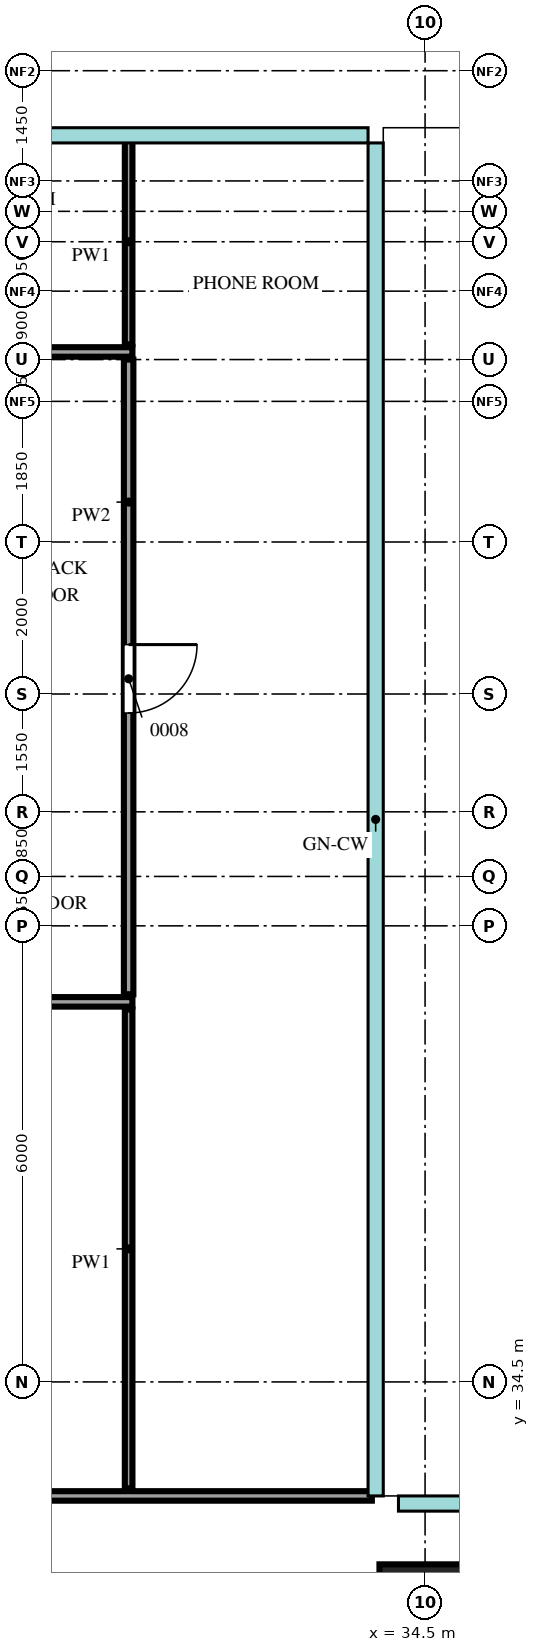
"""IFC4 building model, lengths in metres.
Left out: names, types, materials, properties, quantities, classifications, styles, units other than length and angle.
Written with IfcOpenShell. Run it as: python <this file> out.ifc"""

import sys

from ifc_helpers import new_model, si_unit, direction, frame, frame_2d, origin, origin_2d, place, context, subcontext, project, spatial, rectangle, extrude, source, transform, mapped, element, fill, save


model = new_model("IFC4")
c1 = context("Model", 3, precision=1e-05, world=origin(), true_north=direction((0.0, 1.0)))
c2 = subcontext(c1, "Body", "Model", "MODEL_VIEW")
j1 = project(units=[si_unit("LENGTHUNIT", "METRE"), si_unit("PLANEANGLEUNIT", "RADIAN")], contexts=[c1])
p1 = place(None, origin())
s1 = spatial("IfcSite", under=j1, at=p1, CompositionType="ELEMENT")
p2 = place(p1, origin())
s2 = spatial("IfcBuilding", under=s1, at=p2, CompositionType="ELEMENT")
p3 = place(p2, frame((0.0, 0.0, 184.7)))
s3 = spatial("IfcBuildingStorey", under=s2, at=p3, CompositionType="ELEMENT", Elevation=184.7)
m1 = source(origin(), c2, "Body", "SweptSolid", [
    extrude(rectangle(XDim=1.2, YDim=1.2, at=origin_2d()), origin(), (0.0, 0.0, 1.0), 3.75),
])
p4 = place(p3, frame((34.5, 31.5, 0.0), z_axis=(0.0, 0.0, 1.0), x_axis=(1.0, 0.0, 0.0)))
e1 = element("IfcColumn", 1, at=p4, inside=s3, PredefinedType="COLUMN", context=c2, shape_type="MappedRepresentation", body=[
    mapped(m1, transform((0.0, 0.0, 0.0))),
])
m2 = source(origin(), c2, "Body", "SweptSolid", [
    extrude(rectangle(XDim=10.45, YDim=0.125, at=frame_2d((5.225, 0.0))), origin(), (0.0, 0.0, 1.0), 3.8),
])
p5 = place(p3, frame((23.35, 33.0, 0.0), z_axis=(0.0, 0.0, 1.0), x_axis=(1.0, 0.0, 0.0)))
e2 = element("IfcWall", 2, at=p5, inside=s3, PredefinedType="PARTITIONING", context=c2, shape_type="MappedRepresentation", body=[
    mapped(m2, transform((0.0, 0.0, 0.0))),
])
m3 = source(origin(), c2, "Body", "SweptSolid", [
    extrude(rectangle(XDim=6.3, YDim=0.1, at=frame_2d((3.15, 0.0))), origin(), (0.0, 0.0, 1.0), 3.8),
])
p6 = place(p3, frame((30.6, 33.1, 0.0), z_axis=(0.0, 0.0, 1.0), x_axis=(0.0, 1.0, 0.0)))
e3 = element("IfcWall", 3, at=p6, inside=s3, PredefinedType="PARTITIONING", context=c2, shape_type="MappedRepresentation", body=[
    mapped(m3, transform((0.0, 0.0, 0.0))),
])
m4 = source(origin(), c2, "Body", "SweptSolid", [
    extrude(rectangle(XDim=7.3, YDim=0.125, at=frame_2d((3.65, 0.0))), origin(), (0.0, 0.0, 1.0), 3.8),
])
p7 = place(p3, frame((23.35, 39.5, 0.0), z_axis=(0.0, 0.0, 1.0), x_axis=(1.0, 0.0, 0.0)))
e4 = element("IfcWall", 4, at=p7, inside=s3, PredefinedType="PARTITIONING", context=c2, shape_type="MappedRepresentation", body=[
    mapped(m4, transform((0.0, 0.0, 0.0))),
])
m5 = source(origin(), c2, "Body", "SweptSolid", [
    extrude(rectangle(XDim=0.9, YDim=2.1, at=frame_2d((0.45, 1.05))), frame((0.0, 0.073, 0.0), z_axis=(0.0, -1.0, 0.0), x_axis=(1.0, 0.0, 0.0)), (0.0, 0.0, 1.0), 0.145),
])
p8 = place(p7, frame((3.2, 0.0, 0.0)))
e5 = element("IfcOpeningElement", 5, at=p8, cuts=e4, PredefinedType="OPENING", context=c2, shape_type="MappedRepresentation", body=[
    mapped(m5, transform((0.0, 0.0, 0.0))),
])
m6 = source(origin(), c2, "Body", "SweptSolid", [
    extrude(rectangle(XDim=8.35, YDim=0.125, at=frame_2d((4.175, 0.0))), origin(), (0.0, 0.0, 1.0), 3.8),
])
p9 = place(p3, frame((30.6, 39.6, 0.0), z_axis=(0.0, 0.0, 1.0), x_axis=(0.0, 1.0, 0.0)))
e6 = element("IfcWall", 6, at=p9, inside=s3, PredefinedType="PARTITIONING", context=c2, shape_type="MappedRepresentation", body=[
    mapped(m6, transform((0.0, 0.0, 0.0))),
])
p10 = place(p9, frame((3.7, 0.0, 0.0)))
e7 = element("IfcOpeningElement", 7, at=p10, cuts=e6, PredefinedType="OPENING", context=c2, shape_type="MappedRepresentation", body=[
    mapped(m5, transform((0.0, 0.0, 0.0))),
])
m7 = source(origin(), c2, "Body", "SweptSolid", [
    extrude(rectangle(XDim=2.7, YDim=0.1, at=frame_2d((1.35, 0.0))), origin(), (0.0, 0.0, 1.0), 3.8),
])
p11 = place(p3, frame((30.6, 48.15, 0.0), z_axis=(0.0, 0.0, 1.0), x_axis=(0.0, 1.0, 0.0)))
e8 = element("IfcWall", 8, at=p11, inside=s3, PredefinedType="PARTITIONING", context=c2, shape_type="MappedRepresentation", body=[
    mapped(m7, transform((0.0, 0.0, 0.0))),
])
m8 = source(origin(), c2, "Body", "SweptSolid", [
    extrude(rectangle(XDim=13.9, YDim=0.125, at=frame_2d((6.95, 0.0))), origin(), (0.0, 0.0, 1.0), 3.8),
])
p12 = place(p3, frame((16.75, 48.05, 0.0), z_axis=(0.0, 0.0, 1.0), x_axis=(1.0, 0.0, 0.0)))
e9 = element("IfcWall", 9, at=p12, inside=s3, PredefinedType="PARTITIONING", context=c2, shape_type="MappedRepresentation", body=[
    mapped(m8, transform((0.0, 0.0, 0.0))),
])
p13 = place(p12, frame((2.7, 0.0, 0.0)))
e10 = element("IfcOpeningElement", 10, at=p13, cuts=e9, PredefinedType="OPENING", context=c2, shape_type="MappedRepresentation", body=[
    mapped(m5, transform((0.0, 0.0, 0.0))),
])
p14 = place(p12, frame((11.45, 0.0, 0.0)))
e11 = element("IfcOpeningElement", 11, at=p14, cuts=e9, PredefinedType="OPENING", context=c2, shape_type="MappedRepresentation", body=[
    mapped(m5, transform((0.0, 0.0, 0.0))),
])
m9 = source(origin(), c2, "Body", "SweptSolid", [
    extrude(rectangle(XDim=0.9, YDim=2.1, at=frame_2d((0.45, 1.05))), frame((0.0, 0.025, 0.0), z_axis=(0.0, -1.0, 0.0), x_axis=(1.0, 0.0, 0.0)), (0.0, 0.0, 1.0), 0.05),
])
p15 = place(p10, origin())
e12 = element("IfcDoor", 12, at=p15, inside=s3, OperationType="SINGLE_SWING_RIGHT", PredefinedType="DOOR", context=c2, shape_type="MappedRepresentation", body=[
    mapped(m9, transform((0.0, 0.0, 0.0))),
])
fill(e7, e12)
save(model, sys.argv[1])
